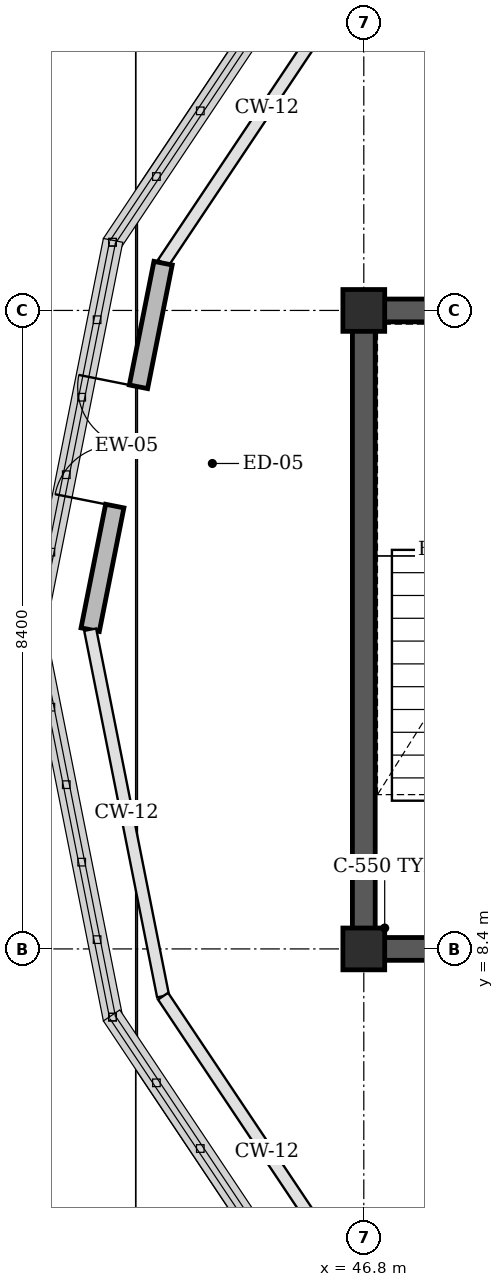
"""IFC4 building model, lengths in metres.
Left out: names, types, materials, properties, quantities, classifications, styles, units other than length and angle.
Written with IfcOpenShell. Run it as: python <this file> out.ifc"""

import sys

from ifc_helpers import new_model, si_unit, direction, frame, frame_2d, origin, origin_2d, place, context, subcontext, project, spatial, rectangle, extrude, element, fill, save


model = new_model("IFC4")
c1 = context("Model", 3, precision=1e-05, world=origin(), true_north=direction((0.0, 1.0)))
c2 = subcontext(c1, "Body", "Model", "MODEL_VIEW")
j1 = project(units=[si_unit("LENGTHUNIT", "METRE"), si_unit("PLANEANGLEUNIT", "RADIAN")], contexts=[c1])
p1 = place(None, origin())
s1 = spatial("IfcSite", under=j1, at=p1, CompositionType="ELEMENT")
p2 = place(p1, origin())
s2 = spatial("IfcBuilding", under=s1, at=p2, CompositionType="ELEMENT")
p3 = place(p2, frame((0.0, 0.0, 39.0)))
s3 = spatial("IfcBuildingStorey", under=s2, at=p3, CompositionType="ELEMENT", Elevation=39.0)
p4 = place(p3, frame((46.65, 16.8, 0.0), z_axis=(0.0, 0.0, 1.0), x_axis=(1.0, 0.0, 0.0)))
e1 = element("IfcWall", 1, at=p4, inside=s3, PredefinedType="SHEAR", context=c2, shape_type="SweptSolid", body=[
    extrude(rectangle(XDim=8.1, YDim=0.3, at=frame_2d((4.05, 0.0))), origin(), (0.0, 0.0, 1.0), 3.92),
])
p5 = place(p3, frame((46.8, 8.4, 0.0), z_axis=(0.0, 0.0, 1.0), x_axis=(0.0, 1.0, 0.0)))
e2 = element("IfcWall", 2, at=p5, inside=s3, PredefinedType="SHEAR", context=c2, shape_type="SweptSolid", body=[
    extrude(rectangle(XDim=8.4, YDim=0.3, at=frame_2d((4.2, 0.0))), origin(), (0.0, 0.0, 1.0), 3.92),
])
for number, where, z_axis, x_axis in (
    (3, (46.8, 8.4, 0.0), (0.0, 0.0, 1.0), (1.0, 0.0, 0.0)),
    (4, (46.8, 16.8, 0.0), (0.0, 0.0, 1.0), (1.0, 0.0, 0.0)),
):
    element("IfcColumn", number, at=place(p3, frame(where, z_axis=z_axis, x_axis=x_axis)), inside=s3, PredefinedType="COLUMN", context=c2, shape_type="SweptSolid", body=[
        extrude(rectangle(XDim=0.55, YDim=0.55, at=origin_2d()), origin(), (0.0, 0.0, 1.0), 4.2),
    ])
p6 = place(p3, frame((43.2, 12.6, 0.0), z_axis=(0.0, 0.0, 1.0), x_axis=(0.195113286981, 0.980780712108, 0.0)))
e5 = element("IfcWall", 5, at=p6, inside=s3, PredefinedType="STANDARD", context=c2, shape_type="SweptSolid", body=[
    extrude(rectangle(XDim=4.916, YDim=0.245, at=frame_2d((2.458, 0.0))), origin(), (0.0, 0.0, 1.0), 3.37),
])
p7 = place(p6, frame((1.658, 0.0, 0.0)))
e6 = element("IfcOpeningElement", 6, at=p7, cuts=e5, PredefinedType="OPENING", context=c2, shape_type="SweptSolid", body=[
    extrude(rectangle(XDim=1.6, YDim=2.2, at=frame_2d((0.8, 1.1))), frame((0.0, 0.133, 0.0), z_axis=(0.0, -1.0, 0.0), x_axis=(1.0, 0.0, 0.0)), (0.0, 0.0, 1.0), 0.265),
])
p8 = place(p3, frame((46.8, 8.4, 0.0), z_axis=(0.0, 0.0, 1.0), x_axis=(1.0, 0.0, 0.0)))
e7 = element("IfcWall", 7, at=p8, inside=s3, PredefinedType="SHEAR", context=c2, shape_type="SweptSolid", body=[
    extrude(rectangle(XDim=4.15, YDim=0.3, at=frame_2d((2.075, 0.0))), origin(), (0.0, 0.0, 1.0), 4.2),
])
p9 = place(p8, frame((1.515, 0.0, 0.0)))
e8 = element("IfcOpeningElement", 8, at=p9, cuts=e7, PredefinedType="OPENING", context=c2, shape_type="SweptSolid", body=[
    extrude(rectangle(XDim=1.12, YDim=2.15, at=frame_2d((0.56, 1.075))), frame((0.0, 0.16, 0.0), z_axis=(0.0, -1.0, 0.0), x_axis=(1.0, 0.0, 0.0)), (0.0, 0.0, 1.0), 0.32),
])
p10 = place(p7, origin())
e9 = element("IfcDoor", 9, at=p10, inside=s3, OperationType="DOUBLE_DOOR_SINGLE_SWING", PredefinedType="DOOR", context=c2, shape_type="SweptSolid", body=[
    extrude(rectangle(XDim=1.6, YDim=2.2, at=frame_2d((0.8, 1.1))), frame((0.0, 0.025, 0.0), z_axis=(0.0, -1.0, 0.0), x_axis=(1.0, 0.0, 0.0)), (0.0, 0.0, 1.0), 0.05),
])
fill(e6, e9)
save(model, sys.argv[1])
